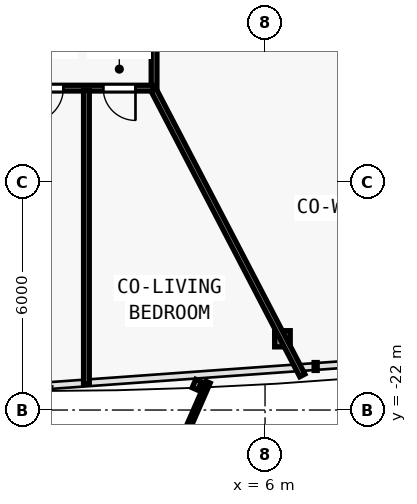
"""IFC4 building model, lengths in metres.
Left out: names, types, materials, properties, quantities, classifications, styles, units other than length and angle.
Written with IfcOpenShell. Run it as: python <this file> out.ifc"""

import sys

from ifc_helpers import new_model, si_unit, direction, frame, frame_2d, origin, origin_2d, place, context, subcontext, project, spatial, rectangle, i_section, extrude, element, fill, save


model = new_model("IFC4")
c1 = context("Model", 3, precision=1e-05, world=origin(), true_north=direction((0.0, 1.0)))
c2 = subcontext(c1, "Body", "Model", "MODEL_VIEW")
j1 = project(units=[si_unit("LENGTHUNIT", "METRE"), si_unit("PLANEANGLEUNIT", "RADIAN")], contexts=[c1])
p1 = place(None, origin())
s1 = spatial("IfcSite", under=j1, at=p1, CompositionType="ELEMENT")
p2 = place(p1, origin())
s2 = spatial("IfcBuilding", under=s1, at=p2, CompositionType="ELEMENT")
p3 = place(p2, frame((0.0, 0.0, 82.5)))
s3 = spatial("IfcBuildingStorey", under=s2, at=p3, CompositionType="ELEMENT", Elevation=82.5)
p4 = place(p3, frame((6.458, -20.125, 0.006), z_axis=(-0.006934288159, 0.035283289748, 0.999353293441), x_axis=(-0.981229659911, -0.192842823335, 0.0)))
e1 = element("IfcColumn", 1, at=p4, inside=s3, PredefinedType="COLUMN", context=c2, shape_type="SweptSolid", body=[
    extrude(i_section(OverallWidth=0.409, OverallDepth=0.425, WebThickness=0.021, FlangeThickness=0.034, FilletRadius=0.015, at=origin_2d()), origin(), (0.0, 0.0, 1.0), 3.591),
])
p5 = place(p3, frame((3.08, -11.56, 0.0), z_axis=(0.0, 0.0, 1.0), x_axis=(0.0, -1.0, 0.0)))
e2 = element("IfcWall", 2, at=p5, inside=s3, PredefinedType="PARTITIONING", context=c2, shape_type="SweptSolid", body=[
    extrude(rectangle(XDim=1.97, YDim=0.15, at=frame_2d((0.985, 0.0))), origin(), (0.0, 0.0, 1.0), 3.055),
])
p6 = place(p3, frame((3.08, -13.53, 0.0), z_axis=(0.0, 0.0, 1.0), x_axis=(-1.0, 0.0, 0.0)))
e3 = element("IfcWall", 3, at=p6, inside=s3, PredefinedType="PARTITIONING", context=c2, shape_type="SweptSolid", body=[
    extrude(rectangle(XDim=6.16, YDim=0.15, at=frame_2d((3.08, 0.0))), origin(), (0.0, 0.0, 1.0), 2.725),
])
p7 = place(p6, frame((4.487, 0.0, 0.0)))
e4 = element("IfcOpeningElement", 4, at=p7, cuts=e3, PredefinedType="OPENING", context=c2, shape_type="SweptSolid", body=[
    extrude(rectangle(XDim=0.9, YDim=2.1, at=frame_2d((0.45, 1.05))), frame((0.0, 0.085, 0.0), z_axis=(0.0, -1.0, 0.0), x_axis=(1.0, 0.0, 0.0)), (0.0, 0.0, 1.0), 0.17),
])
p8 = place(p6, frame((2.386, 0.0, 0.0)))
e5 = element("IfcOpeningElement", 5, at=p8, cuts=e3, PredefinedType="OPENING", context=c2, shape_type="SweptSolid", body=[
    extrude(rectangle(XDim=0.9, YDim=2.1, at=frame_2d((0.45, 1.05))), frame((0.0, 0.085, 0.0), z_axis=(0.0, -1.0, 0.0), x_axis=(1.0, 0.0, 0.0)), (0.0, 0.0, 1.0), 0.17),
])
p9 = place(p6, frame((0.489, 0.0, 0.0)))
e6 = element("IfcOpeningElement", 6, at=p9, cuts=e3, PredefinedType="OPENING", context=c2, shape_type="SweptSolid", body=[
    extrude(rectangle(XDim=0.85, YDim=2.1, at=frame_2d((0.425, 1.05))), frame((0.0, 0.085, 0.0), z_axis=(0.0, -1.0, 0.0), x_axis=(1.0, 0.0, 0.0)), (0.0, 0.0, 1.0), 0.17),
])
p10 = place(p3, frame((3.066, -13.573, 0.0), z_axis=(0.0, 0.0, 1.0), x_axis=(0.461995798776, -0.886882112749, 0.0)))
e7 = element("IfcWall", 7, at=p10, inside=s3, PredefinedType="PARTITIONING", context=c2, shape_type="SweptSolid", body=[
    extrude(rectangle(XDim=8.474, YDim=0.15, at=frame_2d((4.237, 0.0))), origin(), (0.0, 0.0, 1.0), 2.725),
])
p11 = place(p3, frame((1.3, -13.59, 0.0), z_axis=(0.0, 0.0, 1.0), x_axis=(0.0, -1.0, 0.0)))
e8 = element("IfcWall", 8, at=p11, inside=s3, PredefinedType="PARTITIONING", context=c2, shape_type="SweptSolid", body=[
    extrude(rectangle(XDim=7.727, YDim=0.15, at=frame_2d((3.864, 0.0))), origin(), (0.0, 0.0, 1.0), 2.835),
])
p12 = place(p8, origin())
e9 = element("IfcDoor", 9, at=p12, inside=s3, OperationType="SINGLE_SWING_RIGHT", PredefinedType="DOOR", context=c2, shape_type="SweptSolid", body=[
    extrude(rectangle(XDim=0.9, YDim=2.1, at=frame_2d((0.45, 1.05))), frame((0.0, 0.025, 0.0), z_axis=(0.0, -1.0, 0.0), x_axis=(1.0, 0.0, 0.0)), (0.0, 0.0, 1.0), 0.05),
])
fill(e5, e9)
p13 = place(p9, origin())
e10 = element("IfcDoor", 10, at=p13, inside=s3, OperationType="SINGLE_SWING_LEFT", PredefinedType="DOOR", context=c2, shape_type="SweptSolid", body=[
    extrude(rectangle(XDim=0.85, YDim=2.1, at=frame_2d((0.425, 1.05))), frame((0.0, 0.025, 0.0), z_axis=(0.0, -1.0, 0.0), x_axis=(1.0, 0.0, 0.0)), (0.0, 0.0, 1.0), 0.05),
])
fill(e6, e10)
save(model, sys.argv[1])
